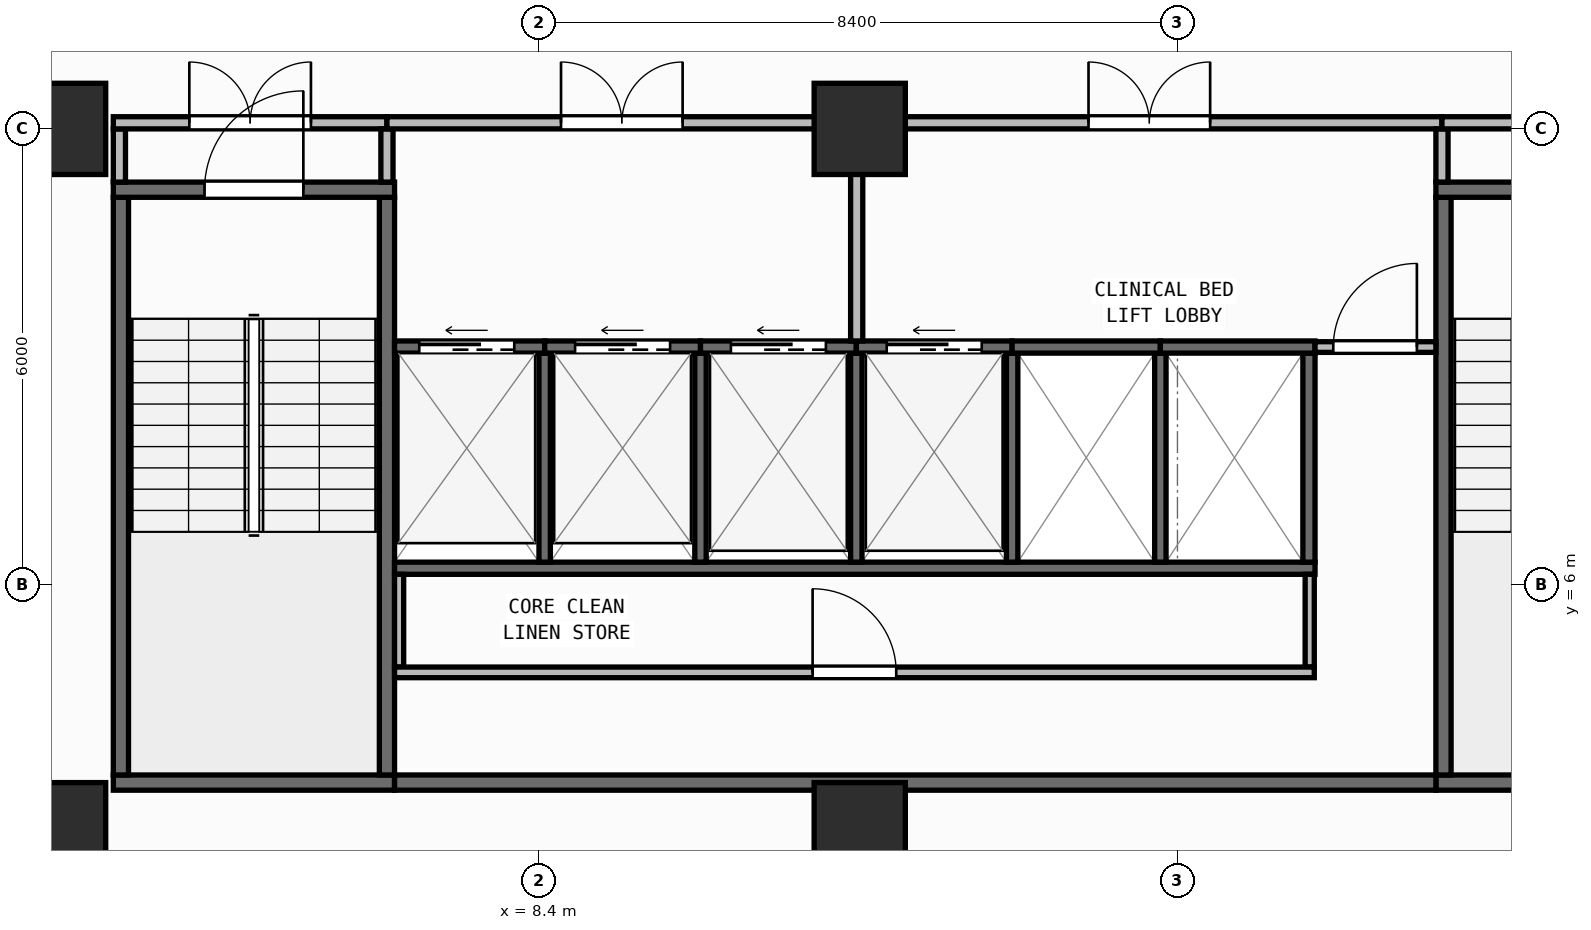
"""IFC4 building model, lengths in metres.
Left out: names, types, materials, properties, quantities, classifications, styles, units other than length and angle.
Written with IfcOpenShell. Run it as: python <this file> out.ifc"""

import sys

from ifc_helpers import new_model, si_unit, direction, frame, frame_2d, origin, origin_2d, place, context, subcontext, project, spatial, rectangle, extrude, element, fill, save


model = new_model("IFC4")
c1 = context("Model", 3, precision=1e-05, world=origin(), true_north=direction((0.0, 1.0)))
c2 = subcontext(c1, "Body", "Model", "MODEL_VIEW")
j1 = project(units=[si_unit("LENGTHUNIT", "METRE"), si_unit("PLANEANGLEUNIT", "RADIAN")], contexts=[c1])
p1 = place(None, origin())
s1 = spatial("IfcSite", under=j1, at=p1, CompositionType="ELEMENT")
p2 = place(p1, origin())
s2 = spatial("IfcBuilding", under=s1, at=p2, CompositionType="ELEMENT")
p3 = place(p2, frame((0.0, 0.0, 134.95)))
s3 = spatial("IfcBuildingStorey", under=s2, at=p3, CompositionType="ELEMENT", Elevation=134.95)
for number, where, z_axis, x_axis in (
    (1, (2.1, 2.8, 0.0), (0.0, 0.0, 1.0), (1.0, 0.0, 0.0)),
    (2, (12.62, 2.8, 0.0), (0.0, 0.0, 1.0), (1.0, 0.0, 0.0)),
    (3, (2.1, 12.0, 0.0), (0.0, 0.0, 1.0), (1.0, 0.0, 0.0)),
    (4, (12.62, 12.0, 0.0), (0.0, 0.0, 1.0), (1.0, 0.0, 0.0)),
):
    element("IfcColumn", number, at=place(p3, frame(where, z_axis=z_axis, x_axis=x_axis)), inside=s3, PredefinedType="COLUMN", context=c2, shape_type="SweptSolid", body=[
        extrude(rectangle(XDim=1.2, YDim=1.2, at=origin_2d()), origin(), (0.0, 0.0, 1.0), 3.95),
    ])
p4 = place(p3, frame((2.76, 0.173, 0.0), z_axis=(0.0, 0.0, 1.0), x_axis=(0.996857931723, 0.079210251617, 0.0)))
e5 = element("IfcWall", 5, at=p4, inside=s3, PredefinedType="STANDARD", context=c2, shape_type="SweptSolid", body=[
    extrude(rectangle(XDim=51.442, YDim=0.26, at=frame_2d((25.721, 0.0))), origin(), (0.0, 0.0, 1.0), 3.71),
])
p5 = place(p4, frame((24.521, 0.0, 0.9)))
e6 = element("IfcOpeningElement", 6, at=p5, cuts=e5, PredefinedType="OPENING", context=c2, shape_type="SweptSolid", body=[
    extrude(rectangle(XDim=2.4, YDim=1.65, at=frame_2d((1.2, 0.825))), frame((0.0, 0.14, 0.0), z_axis=(0.0, -1.0, 0.0), x_axis=(1.0, 0.0, 0.0)), (0.0, 0.0, 1.0), 0.28),
])
p6 = place(p3, frame((2.8, 3.4, 0.0), z_axis=(0.0, 0.0, 1.0), x_axis=(1.0, 0.0, 0.0)))
e7 = element("IfcWall", 7, at=p6, inside=s3, PredefinedType="SHEAR", context=c2, shape_type="SweptSolid", body=[
    extrude(rectangle(XDim=3.7, YDim=0.2, at=frame_2d((1.85, 0.0))), origin(), (0.0, 0.0, 1.0), 3.71),
])
for number, where, z_axis, x_axis in (
    (8, (2.9, 3.5, 0.0), (0.0, 0.0, 1.0), (0.0, 1.0, 0.0)),
    (9, (6.4, 3.5, 0.0), (0.0, 0.0, 1.0), (0.0, 1.0, 0.0)),
):
    element("IfcWall", number, at=place(p3, frame(where, z_axis=z_axis, x_axis=x_axis)), inside=s3, PredefinedType="SHEAR", context=c2, shape_type="SweptSolid", body=[
        extrude(rectangle(XDim=7.6, YDim=0.2, at=frame_2d((3.8, 0.0))), origin(), (0.0, 0.0, 1.0), 3.71),
    ])
p7 = place(p3, frame((2.8, 11.2, 0.0), z_axis=(0.0, 0.0, 1.0), x_axis=(1.0, 0.0, 0.0)))
e10 = element("IfcWall", 10, at=p7, inside=s3, PredefinedType="SHEAR", context=c2, shape_type="SweptSolid", body=[
    extrude(rectangle(XDim=3.7, YDim=0.2, at=frame_2d((1.85, 0.0))), origin(), (0.0, 0.0, 1.0), 3.71),
])
p8 = place(p7, frame((1.2, 0.0, 0.0)))
e11 = element("IfcOpeningElement", 11, at=p8, cuts=e10, PredefinedType="OPENING", context=c2, shape_type="SweptSolid", body=[
    extrude(rectangle(XDim=1.3, YDim=2.15, at=frame_2d((0.65, 1.075))), frame((0.0, 0.11, 0.0), z_axis=(0.0, -1.0, 0.0), x_axis=(1.0, 0.0, 0.0)), (0.0, 0.0, 1.0), 0.22),
])
p9 = place(p3, frame((20.2, 3.4, 0.0), z_axis=(0.0, 0.0, 1.0), x_axis=(1.0, 0.0, 0.0)))
e12 = element("IfcWall", 12, at=p9, inside=s3, PredefinedType="SHEAR", context=c2, shape_type="SweptSolid", body=[
    extrude(rectangle(XDim=3.7, YDim=0.2, at=frame_2d((1.85, 0.0))), origin(), (0.0, 0.0, 1.0), 3.71),
])
p10 = place(p3, frame((20.3, 3.5, 0.0), z_axis=(0.0, 0.0, 1.0), x_axis=(0.0, 1.0, 0.0)))
e13 = element("IfcWall", 13, at=p10, inside=s3, PredefinedType="SHEAR", context=c2, shape_type="SweptSolid", body=[
    extrude(rectangle(XDim=7.6, YDim=0.2, at=frame_2d((3.8, 0.0))), origin(), (0.0, 0.0, 1.0), 3.71),
])
p11 = place(p3, frame((20.2, 11.2, 0.0), z_axis=(0.0, 0.0, 1.0), x_axis=(1.0, 0.0, 0.0)))
e14 = element("IfcWall", 14, at=p11, inside=s3, PredefinedType="SHEAR", context=c2, shape_type="SweptSolid", body=[
    extrude(rectangle(XDim=3.7, YDim=0.2, at=frame_2d((1.85, 0.0))), origin(), (0.0, 0.0, 1.0), 3.71),
])
p12 = place(p11, frame((1.2, 0.0, 0.0)))
e15 = element("IfcOpeningElement", 15, at=p12, cuts=e14, PredefinedType="OPENING", context=c2, shape_type="SweptSolid", body=[
    extrude(rectangle(XDim=1.3, YDim=2.15, at=frame_2d((0.65, 1.075))), frame((0.0, 0.11, 0.0), z_axis=(0.0, -1.0, 0.0), x_axis=(1.0, 0.0, 0.0)), (0.0, 0.0, 1.0), 0.22),
])
p13 = place(p3, frame((6.5, 3.4, 0.0), z_axis=(0.0, 0.0, 1.0), x_axis=(1.0, 0.0, 0.0)))
e16 = element("IfcWall", 16, at=p13, inside=s3, PredefinedType="SHEAR", context=c2, shape_type="SweptSolid", body=[
    extrude(rectangle(XDim=13.7, YDim=0.2, at=frame_2d((6.85, 0.0))), origin(), (0.0, 0.0, 1.0), 3.71),
])
p14 = place(p3, frame((6.5, 6.22, 0.0), z_axis=(0.0, 0.0, 1.0), x_axis=(1.0, 0.0, 0.0)))
e17 = element("IfcWall", 17, at=p14, inside=s3, PredefinedType="SHEAR", context=c2, shape_type="SweptSolid", body=[
    extrude(rectangle(XDim=12.11, YDim=0.16, at=frame_2d((6.055, 0.0))), origin(), (0.0, 0.0, 1.0), 3.71),
])
p15 = place(p3, frame((18.53, 6.3, 0.0), z_axis=(0.0, 0.0, 1.0), x_axis=(0.0, 1.0, 0.0)))
e18 = element("IfcWall", 18, at=p15, inside=s3, PredefinedType="SHEAR", context=c2, shape_type="SweptSolid", body=[
    extrude(rectangle(XDim=2.75, YDim=0.16, at=frame_2d((1.375, 0.0))), origin(), (0.0, 0.0, 1.0), 3.71),
])
for number, where, z_axis, x_axis in (
    (19, (8.475, 6.3, 0.0), (0.0, 0.0, 1.0), (0.0, 1.0, 0.0)),
    (20, (10.525, 6.3, 0.0), (0.0, 0.0, 1.0), (0.0, 1.0, 0.0)),
    (21, (12.575, 6.3, 0.0), (0.0, 0.0, 1.0), (0.0, 1.0, 0.0)),
    (22, (14.625, 6.3, 0.0), (0.0, 0.0, 1.0), (0.0, 1.0, 0.0)),
    (23, (16.575, 6.3, 0.0), (0.0, 0.0, 1.0), (0.0, 1.0, 0.0)),
):
    element("IfcWall", number, at=place(p3, frame(where, z_axis=z_axis, x_axis=x_axis)), inside=s3, PredefinedType="SHEAR", context=c2, shape_type="SweptSolid", body=[
        extrude(rectangle(XDim=2.75, YDim=0.15, at=frame_2d((1.375, 0.0))), origin(), (0.0, 0.0, 1.0), 3.71),
    ])
p16 = place(p3, frame((6.5, 9.13, 0.0), z_axis=(0.0, 0.0, 1.0), x_axis=(1.0, 0.0, 0.0)))
e24 = element("IfcWall", 24, at=p16, inside=s3, PredefinedType="SHEAR", context=c2, shape_type="SweptSolid", body=[
    extrude(rectangle(XDim=1.975, YDim=0.16, at=frame_2d((0.988, 0.0))), origin(), (0.0, 0.0, 1.0), 3.71),
])
p17 = place(p16, frame((0.325, 0.0, 0.0)))
e25 = element("IfcOpeningElement", 25, at=p17, cuts=e24, PredefinedType="OPENING", context=c2, shape_type="SweptSolid", body=[
    extrude(rectangle(XDim=1.25, YDim=2.15, at=frame_2d((0.625, 1.075))), frame((0.0, 0.09, 0.0), z_axis=(0.0, -1.0, 0.0), x_axis=(1.0, 0.0, 0.0)), (0.0, 0.0, 1.0), 0.18),
])
p18 = place(p3, frame((8.475, 9.13, 0.0), z_axis=(0.0, 0.0, 1.0), x_axis=(1.0, 0.0, 0.0)))
e26 = element("IfcWall", 26, at=p18, inside=s3, PredefinedType="SHEAR", context=c2, shape_type="SweptSolid", body=[
    extrude(rectangle(XDim=2.05, YDim=0.16, at=frame_2d((1.025, 0.0))), origin(), (0.0, 0.0, 1.0), 3.71),
])
p19 = place(p18, frame((0.4, 0.0, 0.0)))
e27 = element("IfcOpeningElement", 27, at=p19, cuts=e26, PredefinedType="OPENING", context=c2, shape_type="SweptSolid", body=[
    extrude(rectangle(XDim=1.25, YDim=2.15, at=frame_2d((0.625, 1.075))), frame((0.0, 0.09, 0.0), z_axis=(0.0, -1.0, 0.0), x_axis=(1.0, 0.0, 0.0)), (0.0, 0.0, 1.0), 0.18),
])
p20 = place(p3, frame((10.525, 9.13, 0.0), z_axis=(0.0, 0.0, 1.0), x_axis=(1.0, 0.0, 0.0)))
e28 = element("IfcWall", 28, at=p20, inside=s3, PredefinedType="SHEAR", context=c2, shape_type="SweptSolid", body=[
    extrude(rectangle(XDim=2.05, YDim=0.16, at=frame_2d((1.025, 0.0))), origin(), (0.0, 0.0, 1.0), 3.71),
])
p21 = place(p20, frame((0.4, 0.0, 0.0)))
e29 = element("IfcOpeningElement", 29, at=p21, cuts=e28, PredefinedType="OPENING", context=c2, shape_type="SweptSolid", body=[
    extrude(rectangle(XDim=1.25, YDim=2.15, at=frame_2d((0.625, 1.075))), frame((0.0, 0.09, 0.0), z_axis=(0.0, -1.0, 0.0), x_axis=(1.0, 0.0, 0.0)), (0.0, 0.0, 1.0), 0.18),
])
p22 = place(p3, frame((12.575, 9.13, 0.0), z_axis=(0.0, 0.0, 1.0), x_axis=(1.0, 0.0, 0.0)))
e30 = element("IfcWall", 30, at=p22, inside=s3, PredefinedType="SHEAR", context=c2, shape_type="SweptSolid", body=[
    extrude(rectangle(XDim=2.05, YDim=0.16, at=frame_2d((1.025, 0.0))), origin(), (0.0, 0.0, 1.0), 3.71),
])
p23 = place(p22, frame((0.4, 0.0, 0.0)))
e31 = element("IfcOpeningElement", 31, at=p23, cuts=e30, PredefinedType="OPENING", context=c2, shape_type="SweptSolid", body=[
    extrude(rectangle(XDim=1.25, YDim=2.15, at=frame_2d((0.625, 1.075))), frame((0.0, 0.09, 0.0), z_axis=(0.0, -1.0, 0.0), x_axis=(1.0, 0.0, 0.0)), (0.0, 0.0, 1.0), 0.18),
])
p24 = place(p3, frame((14.625, 9.13, 0.0), z_axis=(0.0, 0.0, 1.0), x_axis=(1.0, 0.0, 0.0)))
e32 = element("IfcWall", 32, at=p24, inside=s3, PredefinedType="SHEAR", context=c2, shape_type="SweptSolid", body=[
    extrude(rectangle(XDim=1.95, YDim=0.16, at=frame_2d((0.975, 0.0))), origin(), (0.0, 0.0, 1.0), 3.71),
])
p25 = place(p3, frame((16.575, 9.13, 0.0), z_axis=(0.0, 0.0, 1.0), x_axis=(1.0, 0.0, 0.0)))
e33 = element("IfcWall", 33, at=p25, inside=s3, PredefinedType="SHEAR", context=c2, shape_type="SweptSolid", body=[
    extrude(rectangle(XDim=2.035, YDim=0.16, at=frame_2d((1.018, 0.0))), origin(), (0.0, 0.0, 1.0), 3.71),
])
for number, where, z_axis, x_axis in (
    (34, (6.56, 4.92, 0.0), (0.0, 0.0, 1.0), (0.0, 1.0, 0.0)),
    (35, (18.54, 4.92, 0.0), (0.0, 0.0, 1.0), (0.0, 1.0, 0.0)),
):
    element("IfcWall", number, at=place(p3, frame(where, z_axis=z_axis, x_axis=x_axis)), inside=s3, PredefinedType="PARTITIONING", context=c2, shape_type="SweptSolid", body=[
        extrude(rectangle(XDim=1.22, YDim=0.12, at=frame_2d((0.61, 0.0))), origin(), (0.0, 0.0, 1.0), 3.71),
    ])
p26 = place(p3, frame((6.5, 4.85, 0.0), z_axis=(0.0, 0.0, 1.0), x_axis=(1.0, 0.0, 0.0)))
e36 = element("IfcWall", 36, at=p26, inside=s3, PredefinedType="PARTITIONING", context=c2, shape_type="SweptSolid", body=[
    extrude(rectangle(XDim=12.1, YDim=0.14, at=frame_2d((6.05, 0.0))), origin(), (0.0, 0.0, 1.0), 3.71),
])
p27 = place(p26, frame((5.5, 0.0, 0.0)))
e37 = element("IfcOpeningElement", 37, at=p27, cuts=e36, PredefinedType="OPENING", context=c2, shape_type="SweptSolid", body=[
    extrude(rectangle(XDim=1.1, YDim=2.1, at=frame_2d((0.55, 1.05))), frame((0.0, 0.08, 0.0), z_axis=(0.0, -1.0, 0.0), x_axis=(1.0, 0.0, 0.0)), (0.0, 0.0, 1.0), 0.16),
])
p28 = place(p3, frame((18.61, 9.13, 0.0), z_axis=(0.0, 0.0, 1.0), x_axis=(1.0, 0.0, 0.0)))
e38 = element("IfcWall", 38, at=p28, inside=s3, PredefinedType="PARTITIONING", context=c2, shape_type="SweptSolid", body=[
    extrude(rectangle(XDim=1.59, YDim=0.14, at=frame_2d((0.795, 0.0))), origin(), (0.0, 0.0, 1.0), 3.71),
])
p29 = place(p28, frame((0.24, 0.0, 0.0)))
e39 = element("IfcOpeningElement", 39, at=p29, cuts=e38, PredefinedType="OPENING", context=c2, shape_type="SweptSolid", body=[
    extrude(rectangle(XDim=1.1, YDim=2.1, at=frame_2d((0.55, 1.05))), frame((0.0, 0.08, 0.0), z_axis=(0.0, -1.0, 0.0), x_axis=(1.0, 0.0, 0.0)), (0.0, 0.0, 1.0), 0.16),
])
p30 = place(p3, frame((2.88, 11.3, 0.0), z_axis=(0.0, 0.0, 1.0), x_axis=(0.0, 1.0, 0.0)))
e40 = element("IfcWall", 40, at=p30, inside=s3, PredefinedType="PARTITIONING", context=c2, shape_type="SweptSolid", body=[
    extrude(rectangle(XDim=0.7, YDim=0.16, at=frame_2d((0.35, 0.0))), origin(), (0.0, 0.0, 1.0), 3.71),
])
p31 = place(p3, frame((2.8, 12.08, 0.0), z_axis=(0.0, 0.0, 1.0), x_axis=(1.0, 0.0, 0.0)))
e41 = element("IfcWall", 41, at=p31, inside=s3, PredefinedType="PARTITIONING", context=c2, shape_type="SweptSolid", body=[
    extrude(rectangle(XDim=3.6, YDim=0.16, at=frame_2d((1.8, 0.0))), origin(), (0.0, 0.0, 1.0), 3.083),
])
p32 = place(p31, frame((1.0, 0.0, 0.0)))
e42 = element("IfcOpeningElement", 42, at=p32, cuts=e41, PredefinedType="OPENING", context=c2, shape_type="SweptSolid", body=[
    extrude(rectangle(XDim=1.6, YDim=2.05, at=frame_2d((0.8, 1.025))), frame((0.0, 0.09, 0.0), z_axis=(0.0, -1.0, 0.0), x_axis=(1.0, 0.0, 0.0)), (0.0, 0.0, 1.0), 0.18),
])
p33 = place(p3, frame((6.4, 11.3, 0.0), z_axis=(0.0, 0.0, 1.0), x_axis=(0.0, 1.0, 0.0)))
e43 = element("IfcWall", 43, at=p33, inside=s3, PredefinedType="PARTITIONING", context=c2, shape_type="SweptSolid", body=[
    extrude(rectangle(XDim=0.7, YDim=0.16, at=frame_2d((0.35, 0.0))), origin(), (0.0, 0.0, 1.0), 3.71),
])
p34 = place(p3, frame((6.4, 12.08, 0.0), z_axis=(0.0, 0.0, 1.0), x_axis=(1.0, 0.0, 0.0)))
e44 = element("IfcWall", 44, at=p34, inside=s3, PredefinedType="PARTITIONING", context=c2, shape_type="SweptSolid", body=[
    extrude(rectangle(XDim=6.18, YDim=0.16, at=frame_2d((3.09, 0.0))), origin(), (0.0, 0.0, 1.0), 3.083),
])
p35 = place(p34, frame((2.29, 0.0, 0.0)))
e45 = element("IfcOpeningElement", 45, at=p35, cuts=e44, PredefinedType="OPENING", context=c2, shape_type="SweptSolid", body=[
    extrude(rectangle(XDim=1.6, YDim=2.05, at=frame_2d((0.8, 1.025))), frame((0.0, 0.09, 0.0), z_axis=(0.0, -1.0, 0.0), x_axis=(1.0, 0.0, 0.0)), (0.0, 0.0, 1.0), 0.18),
])
p36 = place(p3, frame((12.58, 9.21, 0.0), z_axis=(0.0, 0.0, 1.0), x_axis=(0.0, 1.0, 0.0)))
e46 = element("IfcWall", 46, at=p36, inside=s3, PredefinedType="PARTITIONING", context=c2, shape_type="SweptSolid", body=[
    extrude(rectangle(XDim=2.79, YDim=0.16, at=frame_2d((1.395, 0.0))), origin(), (0.0, 0.0, 1.0), 3.71),
])
p37 = place(p3, frame((12.58, 12.08, 0.0), z_axis=(0.0, 0.0, 1.0), x_axis=(1.0, 0.0, 0.0)))
e47 = element("IfcWall", 47, at=p37, inside=s3, PredefinedType="PARTITIONING", context=c2, shape_type="SweptSolid", body=[
    extrude(rectangle(XDim=7.7, YDim=0.16, at=frame_2d((3.85, 0.0))), origin(), (0.0, 0.0, 1.0), 3.083),
])
p38 = place(p37, frame((3.05, 0.0, 0.0)))
e48 = element("IfcOpeningElement", 48, at=p38, cuts=e47, PredefinedType="OPENING", context=c2, shape_type="SweptSolid", body=[
    extrude(rectangle(XDim=1.6, YDim=2.05, at=frame_2d((0.8, 1.025))), frame((0.0, 0.09, 0.0), z_axis=(0.0, -1.0, 0.0), x_axis=(1.0, 0.0, 0.0)), (0.0, 0.0, 1.0), 0.18),
])
p39 = place(p3, frame((20.28, 11.3, 0.0), z_axis=(0.0, 0.0, 1.0), x_axis=(0.0, 1.0, 0.0)))
e49 = element("IfcWall", 49, at=p39, inside=s3, PredefinedType="PARTITIONING", context=c2, shape_type="SweptSolid", body=[
    extrude(rectangle(XDim=0.7, YDim=0.16, at=frame_2d((0.35, 0.0))), origin(), (0.0, 0.0, 1.0), 3.71),
])
p40 = place(p3, frame((20.28, 12.08, 0.0), z_axis=(0.0, 0.0, 1.0), x_axis=(1.0, 0.0, 0.0)))
e50 = element("IfcWall", 50, at=p40, inside=s3, PredefinedType="PARTITIONING", context=c2, shape_type="SweptSolid", body=[
    extrude(rectangle(XDim=3.62, YDim=0.16, at=frame_2d((1.81, 0.0))), origin(), (0.0, 0.0, 1.0), 3.083),
])
p41 = place(p40, frame((1.01, 0.0, 0.0)))
e51 = element("IfcOpeningElement", 51, at=p41, cuts=e50, PredefinedType="OPENING", context=c2, shape_type="SweptSolid", body=[
    extrude(rectangle(XDim=1.6, YDim=2.05, at=frame_2d((0.8, 1.025))), frame((0.0, 0.09, 0.0), z_axis=(0.0, -1.0, 0.0), x_axis=(1.0, 0.0, 0.0)), (0.0, 0.0, 1.0), 0.18),
])
p42 = place(p8, origin())
e52 = element("IfcDoor", 52, at=p42, inside=s3, OperationType="SINGLE_SWING_RIGHT", PredefinedType="DOOR", context=c2, shape_type="SweptSolid", body=[
    extrude(rectangle(XDim=1.3, YDim=2.15, at=frame_2d((0.65, 1.075))), frame((0.0, 0.025, 0.0), z_axis=(0.0, -1.0, 0.0), x_axis=(1.0, 0.0, 0.0)), (0.0, 0.0, 1.0), 0.05),
])
fill(e11, e52)
p43 = place(p17, origin())
e53 = element("IfcDoor", 53, at=p43, inside=s3, OperationType="SLIDING_TO_LEFT", PredefinedType="DOOR", context=c2, shape_type="SweptSolid", body=[
    extrude(rectangle(XDim=1.25, YDim=2.15, at=frame_2d((0.625, 1.075))), frame((0.0, 0.025, 0.0), z_axis=(0.0, -1.0, 0.0), x_axis=(1.0, 0.0, 0.0)), (0.0, 0.0, 1.0), 0.05),
])
fill(e25, e53)
p44 = place(p19, origin())
e54 = element("IfcDoor", 54, at=p44, inside=s3, OperationType="SLIDING_TO_LEFT", PredefinedType="DOOR", context=c2, shape_type="SweptSolid", body=[
    extrude(rectangle(XDim=1.25, YDim=2.15, at=frame_2d((0.625, 1.075))), frame((0.0, 0.025, 0.0), z_axis=(0.0, -1.0, 0.0), x_axis=(1.0, 0.0, 0.0)), (0.0, 0.0, 1.0), 0.05),
])
fill(e27, e54)
p45 = place(p21, origin())
e55 = element("IfcDoor", 55, at=p45, inside=s3, OperationType="SLIDING_TO_LEFT", PredefinedType="DOOR", context=c2, shape_type="SweptSolid", body=[
    extrude(rectangle(XDim=1.25, YDim=2.15, at=frame_2d((0.625, 1.075))), frame((0.0, 0.025, 0.0), z_axis=(0.0, -1.0, 0.0), x_axis=(1.0, 0.0, 0.0)), (0.0, 0.0, 1.0), 0.05),
])
fill(e29, e55)
p46 = place(p23, origin())
e56 = element("IfcDoor", 56, at=p46, inside=s3, OperationType="SLIDING_TO_LEFT", PredefinedType="DOOR", context=c2, shape_type="SweptSolid", body=[
    extrude(rectangle(XDim=1.25, YDim=2.15, at=frame_2d((0.625, 1.075))), frame((0.0, 0.025, 0.0), z_axis=(0.0, -1.0, 0.0), x_axis=(1.0, 0.0, 0.0)), (0.0, 0.0, 1.0), 0.05),
])
fill(e31, e56)
p47 = place(p27, origin())
e57 = element("IfcDoor", 57, at=p47, inside=s3, OperationType="SINGLE_SWING_LEFT", PredefinedType="DOOR", context=c2, shape_type="SweptSolid", body=[
    extrude(rectangle(XDim=1.1, YDim=2.1, at=frame_2d((0.55, 1.05))), frame((0.0, 0.025, 0.0), z_axis=(0.0, -1.0, 0.0), x_axis=(1.0, 0.0, 0.0)), (0.0, 0.0, 1.0), 0.05),
])
fill(e37, e57)
p48 = place(p29, origin())
e58 = element("IfcDoor", 58, at=p48, inside=s3, OperationType="SINGLE_SWING_RIGHT", PredefinedType="DOOR", context=c2, shape_type="SweptSolid", body=[
    extrude(rectangle(XDim=1.1, YDim=2.1, at=frame_2d((0.55, 1.05))), frame((0.0, 0.025, 0.0), z_axis=(0.0, -1.0, 0.0), x_axis=(1.0, 0.0, 0.0)), (0.0, 0.0, 1.0), 0.05),
])
fill(e39, e58)
p49 = place(p32, origin())
e59 = element("IfcDoor", 59, at=p49, inside=s3, OperationType="DOUBLE_DOOR_SINGLE_SWING", PredefinedType="DOOR", context=c2, shape_type="SweptSolid", body=[
    extrude(rectangle(XDim=1.6, YDim=2.05, at=frame_2d((0.8, 1.025))), frame((0.0, 0.025, 0.0), z_axis=(0.0, -1.0, 0.0), x_axis=(1.0, 0.0, 0.0)), (0.0, 0.0, 1.0), 0.05),
])
fill(e42, e59)
p50 = place(p35, origin())
e60 = element("IfcDoor", 60, at=p50, inside=s3, OperationType="DOUBLE_DOOR_SINGLE_SWING", PredefinedType="DOOR", context=c2, shape_type="SweptSolid", body=[
    extrude(rectangle(XDim=1.6, YDim=2.05, at=frame_2d((0.8, 1.025))), frame((0.0, 0.025, 0.0), z_axis=(0.0, -1.0, 0.0), x_axis=(1.0, 0.0, 0.0)), (0.0, 0.0, 1.0), 0.05),
])
fill(e45, e60)
p51 = place(p38, origin())
e61 = element("IfcDoor", 61, at=p51, inside=s3, OperationType="DOUBLE_DOOR_SINGLE_SWING", PredefinedType="DOOR", context=c2, shape_type="SweptSolid", body=[
    extrude(rectangle(XDim=1.6, YDim=2.05, at=frame_2d((0.8, 1.025))), frame((0.0, 0.025, 0.0), z_axis=(0.0, -1.0, 0.0), x_axis=(1.0, 0.0, 0.0)), (0.0, 0.0, 1.0), 0.05),
])
fill(e48, e61)
save(model, sys.argv[1])
